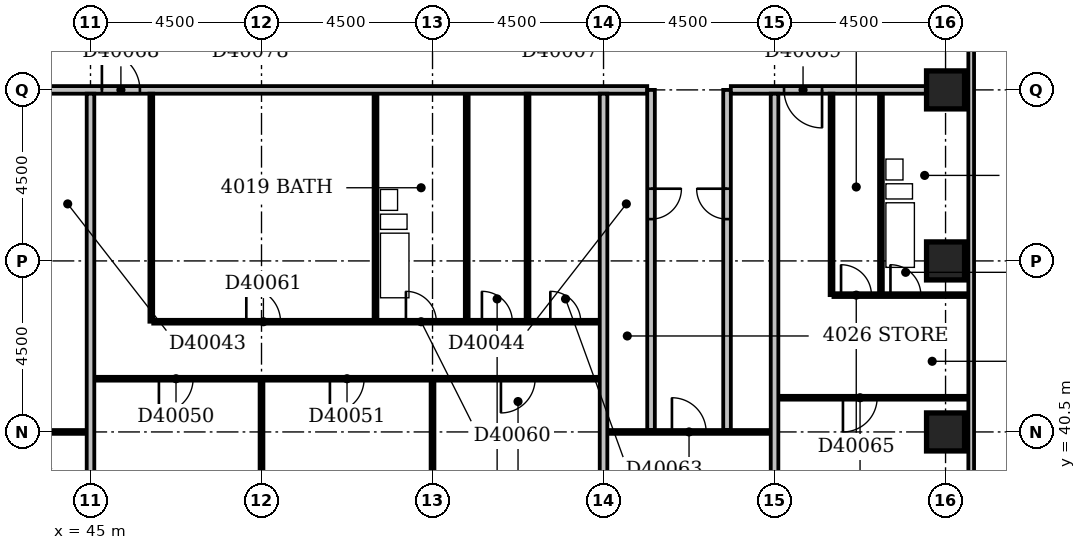
"""IFC4 building model, lengths in metres.
Left out: names, types, materials, properties, quantities, classifications, styles, units other than length and angle.
Written with IfcOpenShell. Run it as: python <this file> out.ifc"""

import sys

from ifc_helpers import new_model, si_unit, direction, frame, frame_2d, origin, origin_2d, place, context, subcontext, project, spatial, rectangle, extrude, element, fill, save


model = new_model("IFC4")
c1 = context("Model", 3, precision=1e-05, world=origin(), true_north=direction((0.0, 1.0)))
c2 = subcontext(c1, "Body", "Model", "MODEL_VIEW")
j1 = project(units=[si_unit("LENGTHUNIT", "METRE"), si_unit("PLANEANGLEUNIT", "RADIAN")], contexts=[c1])
p1 = place(None, origin())
s1 = spatial("IfcSite", under=j1, at=p1, CompositionType="ELEMENT")
p2 = place(p1, origin())
s2 = spatial("IfcBuilding", under=s1, at=p2, CompositionType="ELEMENT")
p3 = place(p2, frame((0.0, 0.0, 159.2)))
s3 = spatial("IfcBuildingStorey", under=s2, at=p3, CompositionType="ELEMENT", Elevation=159.2)
for number, where, z_axis, x_axis in (
    (1, (67.5, 40.5, -0.3), (0.0, 0.0, 1.0), (1.0, 0.0, 0.0)),
    (2, (67.5, 45.0, -0.3), (0.0, 0.0, 1.0), (1.0, 0.0, 0.0)),
    (3, (67.5, 49.5, -0.3), (0.0, 0.0, 1.0), (1.0, 0.0, 0.0)),
):
    element("IfcColumn", number, at=place(p3, frame(where, z_axis=z_axis, x_axis=x_axis)), inside=s3, PredefinedType="COLUMN", context=c2, shape_type="SweptSolid", body=[
        extrude(rectangle(XDim=1.0, YDim=1.0, at=origin_2d()), origin(), (0.0, 0.0, 1.0), 3.6),
    ])
p4 = place(p3, frame((68.175, 35.4, 0.0), z_axis=(0.0, 0.0, 1.0), x_axis=(0.0, 1.0, 0.0)))
e4 = element("IfcWall", 4, at=p4, inside=s3, PredefinedType="STANDARD", context=c2, shape_type="SweptSolid", body=[
    extrude(rectangle(XDim=23.85, YDim=0.15, at=frame_2d((11.925, 0.0))), origin(), (0.0, 0.0, 1.0), 2.7),
])
p5 = place(p4, frame((1.65, 0.0, 0.6)))
e5 = element("IfcOpeningElement", 5, at=p5, cuts=e4, PredefinedType="OPENING", context=c2, shape_type="SweptSolid", body=[
    extrude(rectangle(XDim=2.4, YDim=1.8, at=frame_2d((1.2, 0.9))), frame((0.0, 0.087, 0.0), z_axis=(0.0, -1.0, 0.0), x_axis=(1.0, 0.0, 0.0)), (0.0, 0.0, 1.0), 0.174),
])
p6 = place(p4, frame((19.65, 0.0, 0.6)))
e6 = element("IfcOpeningElement", 6, at=p6, cuts=e4, PredefinedType="OPENING", context=c2, shape_type="SweptSolid", body=[
    extrude(rectangle(XDim=2.4, YDim=1.8, at=frame_2d((1.2, 0.9))), frame((0.0, 0.087, 0.0), z_axis=(0.0, -1.0, 0.0), x_axis=(1.0, 0.0, 0.0)), (0.0, 0.0, 1.0), 0.174),
])
p7 = place(p3, frame((45.0, 36.5, 0.0), z_axis=(0.0, 0.0, 1.0), x_axis=(0.0, 1.0, 0.0)))
e7 = element("IfcWall", 7, at=p7, inside=s3, PredefinedType="PARTITIONING", context=c2, shape_type="SweptSolid", body=[
    extrude(rectangle(XDim=12.9, YDim=0.2, at=frame_2d((6.45, 0.0))), origin(), (0.0, 0.0, 1.0), 2.6),
])
p8 = place(p3, frame((49.5, 36.5, 0.0), z_axis=(0.0, 0.0, 1.0), x_axis=(0.0, 1.0, 0.0)))
e8 = element("IfcWall", 8, at=p8, inside=s3, PredefinedType="PARTITIONING", context=c2, shape_type="SweptSolid", body=[
    extrude(rectangle(XDim=5.35, YDim=0.1, at=frame_2d((2.675, 0.0))), origin(), (0.0, 0.0, 1.0), 3.3),
])
p9 = place(p3, frame((54.0, 36.5, 0.0), z_axis=(0.0, 0.0, 1.0), x_axis=(0.0, 1.0, 0.0)))
e9 = element("IfcWall", 9, at=p9, inside=s3, PredefinedType="PARTITIONING", context=c2, shape_type="SweptSolid", body=[
    extrude(rectangle(XDim=5.35, YDim=0.1, at=frame_2d((2.675, 0.0))), origin(), (0.0, 0.0, 1.0), 2.6),
])
p10 = place(p3, frame((58.5, 36.5, 0.0), z_axis=(0.0, 0.0, 1.0), x_axis=(0.0, 1.0, 0.0)))
e10 = element("IfcWall", 10, at=p10, inside=s3, PredefinedType="PARTITIONING", context=c2, shape_type="SweptSolid", body=[
    extrude(rectangle(XDim=12.9, YDim=0.2, at=frame_2d((6.45, 0.0))), origin(), (0.0, 0.0, 1.0), 3.3),
])
p11 = place(p3, frame((63.0, 36.5, 0.0), z_axis=(0.0, 0.0, 1.0), x_axis=(0.0, 1.0, 0.0)))
e11 = element("IfcWall", 11, at=p11, inside=s3, PredefinedType="PARTITIONING", context=c2, shape_type="SweptSolid", body=[
    extrude(rectangle(XDim=12.9, YDim=0.2, at=frame_2d((6.45, 0.0))), origin(), (0.0, 0.0, 1.0), 2.4),
])
p12 = place(p3, frame((40.6, 40.5, 0.0), z_axis=(0.0, 0.0, 1.0), x_axis=(1.0, 0.0, 0.0)))
e12 = element("IfcWall", 12, at=p12, inside=s3, PredefinedType="PARTITIONING", context=c2, shape_type="SweptSolid", body=[
    extrude(rectangle(XDim=4.3, YDim=0.1, at=frame_2d((2.15, 0.0))), origin(), (0.0, 0.0, 1.0), 3.3),
])
p13 = place(p12, frame((1.7, 0.0, 0.0)))
e13 = element("IfcOpeningElement", 13, at=p13, cuts=e12, PredefinedType="OPENING", context=c2, shape_type="SweptSolid", body=[
    extrude(rectangle(XDim=0.9, YDim=2.1, at=frame_2d((0.45, 1.05))), frame((0.0, 0.062, 0.0), z_axis=(0.0, -1.0, 0.0), x_axis=(1.0, 0.0, 0.0)), (0.0, 0.0, 1.0), 0.124),
])
p14 = place(p3, frame((58.6, 40.5, 0.0), z_axis=(0.0, 0.0, 1.0), x_axis=(1.0, 0.0, 0.0)))
e14 = element("IfcWall", 14, at=p14, inside=s3, PredefinedType="PARTITIONING", context=c2, shape_type="SweptSolid", body=[
    extrude(rectangle(XDim=4.3, YDim=0.1, at=frame_2d((2.15, 0.0))), origin(), (0.0, 0.0, 1.0), 3.3),
])
p15 = place(p14, frame((1.7, 0.0, 0.0)))
e15 = element("IfcOpeningElement", 15, at=p15, cuts=e14, PredefinedType="OPENING", context=c2, shape_type="SweptSolid", body=[
    extrude(rectangle(XDim=0.9, YDim=2.1, at=frame_2d((0.45, 1.05))), frame((0.0, 0.062, 0.0), z_axis=(0.0, -1.0, 0.0), x_axis=(1.0, 0.0, 0.0)), (0.0, 0.0, 1.0), 0.124),
])
p16 = place(p3, frame((59.75, 40.55, 0.0), z_axis=(0.0, 0.0, 1.0), x_axis=(0.0, 1.0, 0.0)))
e16 = element("IfcWall", 16, at=p16, inside=s3, PredefinedType="PARTITIONING", context=c2, shape_type="SweptSolid", body=[
    extrude(rectangle(XDim=8.95, YDim=0.2, at=frame_2d((4.475, 0.0))), origin(), (0.0, 0.0, 1.0), 3.3),
])
p17 = place(p16, frame((5.55, 0.0, 0.0)))
e17 = element("IfcOpeningElement", 17, at=p17, cuts=e16, PredefinedType="OPENING", context=c2, shape_type="SweptSolid", body=[
    extrude(rectangle(XDim=0.8, YDim=2.1, at=frame_2d((0.4, 1.05))), frame((0.0, 0.112, 0.0), z_axis=(0.0, -1.0, 0.0), x_axis=(1.0, 0.0, 0.0)), (0.0, 0.0, 1.0), 0.224),
])
p18 = place(p3, frame((61.75, 40.55, 0.0), z_axis=(0.0, 0.0, 1.0), x_axis=(0.0, 1.0, 0.0)))
e18 = element("IfcWall", 18, at=p18, inside=s3, PredefinedType="PARTITIONING", context=c2, shape_type="SweptSolid", body=[
    extrude(rectangle(XDim=8.95, YDim=0.2, at=frame_2d((4.475, 0.0))), origin(), (0.0, 0.0, 1.0), 3.3),
])
p19 = place(p18, frame((5.55, 0.0, 0.0)))
e19 = element("IfcOpeningElement", 19, at=p19, cuts=e18, PredefinedType="OPENING", context=c2, shape_type="SweptSolid", body=[
    extrude(rectangle(XDim=0.8, YDim=2.1, at=frame_2d((0.4, 1.05))), frame((0.0, 0.112, 0.0), z_axis=(0.0, -1.0, 0.0), x_axis=(1.0, 0.0, 0.0)), (0.0, 0.0, 1.0), 0.224),
])
p20 = place(p3, frame((63.1, 41.4, 0.0), z_axis=(0.0, 0.0, 1.0), x_axis=(1.0, 0.0, 0.0)))
e20 = element("IfcWall", 20, at=p20, inside=s3, PredefinedType="PARTITIONING", context=c2, shape_type="SweptSolid", body=[
    extrude(rectangle(XDim=5.0, YDim=0.1, at=frame_2d((2.5, 0.0))), origin(), (0.0, 0.0, 1.0), 3.3),
])
p21 = place(p20, frame((1.7, 0.0, 0.0)))
e21 = element("IfcOpeningElement", 21, at=p21, cuts=e20, PredefinedType="OPENING", context=c2, shape_type="SweptSolid", body=[
    extrude(rectangle(XDim=0.9, YDim=2.1, at=frame_2d((0.45, 1.05))), frame((0.0, 0.062, 0.0), z_axis=(0.0, -1.0, 0.0), x_axis=(1.0, 0.0, 0.0)), (0.0, 0.0, 1.0), 0.124),
])
p22 = place(p3, frame((45.1, 41.9, 0.0), z_axis=(0.0, 0.0, 1.0), x_axis=(1.0, 0.0, 0.0)))
e22 = element("IfcWall", 22, at=p22, inside=s3, PredefinedType="PARTITIONING", context=c2, shape_type="SweptSolid", body=[
    extrude(rectangle(XDim=13.3, YDim=0.1, at=frame_2d((6.65, 0.0))), origin(), (0.0, 0.0, 1.0), 3.3),
])
p23 = place(p22, frame((1.7, 0.0, 0.0)))
e23 = element("IfcOpeningElement", 23, at=p23, cuts=e22, PredefinedType="OPENING", context=c2, shape_type="SweptSolid", body=[
    extrude(rectangle(XDim=0.9, YDim=2.1, at=frame_2d((0.45, 1.05))), frame((0.0, 0.062, 0.0), z_axis=(0.0, -1.0, 0.0), x_axis=(1.0, 0.0, 0.0)), (0.0, 0.0, 1.0), 0.124),
])
p24 = place(p22, frame((6.2, 0.0, 0.0)))
e24 = element("IfcOpeningElement", 24, at=p24, cuts=e22, PredefinedType="OPENING", context=c2, shape_type="SweptSolid", body=[
    extrude(rectangle(XDim=0.9, YDim=2.1, at=frame_2d((0.45, 1.05))), frame((0.0, 0.062, 0.0), z_axis=(0.0, -1.0, 0.0), x_axis=(1.0, 0.0, 0.0)), (0.0, 0.0, 1.0), 0.124),
])
p25 = place(p22, frame((10.7, 0.0, 0.0)))
e25 = element("IfcOpeningElement", 25, at=p25, cuts=e22, PredefinedType="OPENING", context=c2, shape_type="SweptSolid", body=[
    extrude(rectangle(XDim=0.9, YDim=2.1, at=frame_2d((0.45, 1.05))), frame((0.0, 0.062, 0.0), z_axis=(0.0, -1.0, 0.0), x_axis=(1.0, 0.0, 0.0)), (0.0, 0.0, 1.0), 0.124),
])
p26 = place(p3, frame((46.6, 43.4, 0.0), z_axis=(0.0, 0.0, 1.0), x_axis=(0.0, 1.0, 0.0)))
e26 = element("IfcWall", 26, at=p26, inside=s3, PredefinedType="PARTITIONING", context=c2, shape_type="SweptSolid", body=[
    extrude(rectangle(XDim=6.0, YDim=0.1, at=frame_2d((3.0, 0.0))), origin(), (0.0, 0.0, 1.0), 3.3),
])
p27 = place(p3, frame((46.65, 43.4, 0.0), z_axis=(0.0, 0.0, 1.0), x_axis=(1.0, 0.0, 0.0)))
e27 = element("IfcWall", 27, at=p27, inside=s3, PredefinedType="PARTITIONING", context=c2, shape_type="SweptSolid", body=[
    extrude(rectangle(XDim=11.75, YDim=0.1, at=frame_2d((5.875, 0.0))), origin(), (0.0, 0.0, 1.0), 3.3),
])
p28 = place(p27, frame((6.65, 0.0, 0.0)))
e28 = element("IfcOpeningElement", 28, at=p28, cuts=e27, PredefinedType="OPENING", context=c2, shape_type="SweptSolid", body=[
    extrude(rectangle(XDim=0.8, YDim=2.1, at=frame_2d((0.4, 1.05))), frame((0.0, 0.062, 0.0), z_axis=(0.0, -1.0, 0.0), x_axis=(1.0, 0.0, 0.0)), (0.0, 0.0, 1.0), 0.124),
])
p29 = place(p27, frame((2.45, 0.0, 0.0)))
e29 = element("IfcOpeningElement", 29, at=p29, cuts=e27, PredefinedType="OPENING", context=c2, shape_type="SweptSolid", body=[
    extrude(rectangle(XDim=0.9, YDim=2.1, at=frame_2d((0.45, 1.05))), frame((0.0, 0.062, 0.0), z_axis=(0.0, -1.0, 0.0), x_axis=(1.0, 0.0, 0.0)), (0.0, 0.0, 1.0), 0.124),
])
p30 = place(p27, frame((8.65, 0.0, 0.0)))
e30 = element("IfcOpeningElement", 30, at=p30, cuts=e27, PredefinedType="OPENING", context=c2, shape_type="SweptSolid", body=[
    extrude(rectangle(XDim=0.8, YDim=2.1, at=frame_2d((0.4, 1.05))), frame((0.0, 0.062, 0.0), z_axis=(0.0, -1.0, 0.0), x_axis=(1.0, 0.0, 0.0)), (0.0, 0.0, 1.0), 0.124),
])
p31 = place(p27, frame((10.45, 0.0, 0.0)))
e31 = element("IfcOpeningElement", 31, at=p31, cuts=e27, PredefinedType="OPENING", context=c2, shape_type="SweptSolid", body=[
    extrude(rectangle(XDim=0.8, YDim=2.1, at=frame_2d((0.4, 1.05))), frame((0.0, 0.062, 0.0), z_axis=(0.0, -1.0, 0.0), x_axis=(1.0, 0.0, 0.0)), (0.0, 0.0, 1.0), 0.124),
])
for number, where, z_axis, x_axis in (
    (32, (52.5, 43.45, 0.0), (0.0, 0.0, 1.0), (0.0, 1.0, 0.0)),
    (33, (54.9, 43.45, 0.0), (0.0, 0.0, 1.0), (0.0, 1.0, 0.0)),
):
    element("IfcWall", number, at=place(p3, frame(where, z_axis=z_axis, x_axis=x_axis)), inside=s3, PredefinedType="PLUMBINGWALL", context=c2, shape_type="SweptSolid", body=[
        extrude(rectangle(XDim=5.95, YDim=0.1, at=frame_2d((2.975, 0.0))), origin(), (0.0, 0.0, 1.0), 3.3),
    ])
p32 = place(p3, frame((56.5, 43.45, 0.0), z_axis=(0.0, 0.0, 1.0), x_axis=(0.0, 1.0, 0.0)))
e34 = element("IfcWall", 34, at=p32, inside=s3, PredefinedType="PARTITIONING", context=c2, shape_type="SweptSolid", body=[
    extrude(rectangle(XDim=5.95, YDim=0.1, at=frame_2d((2.975, 0.0))), origin(), (0.0, 0.0, 1.0), 3.3),
])
p33 = place(p3, frame((64.5, 44.1, 0.0), z_axis=(0.0, 0.0, 1.0), x_axis=(0.0, 1.0, 0.0)))
e35 = element("IfcWall", 35, at=p33, inside=s3, PredefinedType="PARTITIONING", context=c2, shape_type="SweptSolid", body=[
    extrude(rectangle(XDim=5.3, YDim=0.1, at=frame_2d((2.65, 0.0))), origin(), (0.0, 0.0, 1.0), 3.3),
])
p34 = place(p3, frame((64.55, 44.1, 0.0), z_axis=(0.0, 0.0, 1.0), x_axis=(1.0, 0.0, 0.0)))
e36 = element("IfcWall", 36, at=p34, inside=s3, PredefinedType="PARTITIONING", context=c2, shape_type="SweptSolid", body=[
    extrude(rectangle(XDim=3.55, YDim=0.1, at=frame_2d((1.775, 0.0))), origin(), (0.0, 0.0, 1.0), 3.3),
])
p35 = place(p34, frame((1.5, 0.0, 0.0)))
e37 = element("IfcOpeningElement", 37, at=p35, cuts=e36, PredefinedType="OPENING", context=c2, shape_type="SweptSolid", body=[
    extrude(rectangle(XDim=0.8, YDim=2.1, at=frame_2d((0.4, 1.05))), frame((0.0, 0.062, 0.0), z_axis=(0.0, -1.0, 0.0), x_axis=(1.0, 0.0, 0.0)), (0.0, 0.0, 1.0), 0.124),
])
p36 = place(p34, frame((0.2, 0.0, 0.0)))
e38 = element("IfcOpeningElement", 38, at=p36, cuts=e36, PredefinedType="OPENING", context=c2, shape_type="SweptSolid", body=[
    extrude(rectangle(XDim=0.8, YDim=2.1, at=frame_2d((0.4, 1.05))), frame((0.0, 0.062, 0.0), z_axis=(0.0, -1.0, 0.0), x_axis=(1.0, 0.0, 0.0)), (0.0, 0.0, 1.0), 0.124),
])
p37 = place(p3, frame((65.8, 44.15, 0.0), z_axis=(0.0, 0.0, 1.0), x_axis=(0.0, 1.0, 0.0)))
e39 = element("IfcWall", 39, at=p37, inside=s3, PredefinedType="PLUMBINGWALL", context=c2, shape_type="SweptSolid", body=[
    extrude(rectangle(XDim=5.25, YDim=0.1, at=frame_2d((2.625, 0.0))), origin(), (0.0, 0.0, 1.0), 3.3),
])
p38 = place(p3, frame((43.85, 49.5, 0.0), z_axis=(0.0, 0.0, 1.0), x_axis=(1.0, 0.0, 0.0)))
e40 = element("IfcWall", 40, at=p38, inside=s3, PredefinedType="PARTITIONING", context=c2, shape_type="SweptSolid", body=[
    extrude(rectangle(XDim=15.8, YDim=0.2, at=frame_2d((7.9, 0.0))), origin(), (0.0, 0.0, 1.0), 3.3),
])
p39 = place(p38, frame((1.45, 0.0, 0.0)))
e41 = element("IfcOpeningElement", 41, at=p39, cuts=e40, PredefinedType="OPENING", context=c2, shape_type="SweptSolid", body=[
    extrude(rectangle(XDim=1.0, YDim=2.1, at=frame_2d((0.5, 1.05))), frame((0.0, 0.112, 0.0), z_axis=(0.0, -1.0, 0.0), x_axis=(1.0, 0.0, 0.0)), (0.0, 0.0, 1.0), 0.224),
])
p40 = place(p3, frame((61.85, 49.5, 0.0), z_axis=(0.0, 0.0, 1.0), x_axis=(1.0, 0.0, 0.0)))
e42 = element("IfcWall", 42, at=p40, inside=s3, PredefinedType="PARTITIONING", context=c2, shape_type="SweptSolid", body=[
    extrude(rectangle(XDim=5.15, YDim=0.2, at=frame_2d((2.575, 0.0))), origin(), (0.0, 0.0, 1.0), 3.3),
])
p41 = place(p40, frame((1.4, 0.0, 0.0)))
e43 = element("IfcOpeningElement", 43, at=p41, cuts=e42, PredefinedType="OPENING", context=c2, shape_type="SweptSolid", body=[
    extrude(rectangle(XDim=1.0, YDim=2.1, at=frame_2d((0.5, 1.05))), frame((0.0, 0.112, 0.0), z_axis=(0.0, -1.0, 0.0), x_axis=(1.0, 0.0, 0.0)), (0.0, 0.0, 1.0), 0.224),
])
p42 = place(p15, origin())
e44 = element("IfcDoor", 44, at=p42, inside=s3, OperationType="SINGLE_SWING_LEFT", PredefinedType="DOOR", context=c2, shape_type="SweptSolid", body=[
    extrude(rectangle(XDim=0.9, YDim=2.1, at=frame_2d((0.45, 1.05))), frame((0.0, 0.025, 0.0), z_axis=(0.0, -1.0, 0.0), x_axis=(1.0, 0.0, 0.0)), (0.0, 0.0, 1.0), 0.05),
])
fill(e15, e44)
p43 = place(p17, origin())
e45 = element("IfcDoor", 45, at=p43, inside=s3, OperationType="SINGLE_SWING_RIGHT", PredefinedType="DOOR", context=c2, shape_type="SweptSolid", body=[
    extrude(rectangle(XDim=0.8, YDim=2.1, at=frame_2d((0.4, 1.05))), frame((0.0, 0.025, 0.0), z_axis=(0.0, -1.0, 0.0), x_axis=(1.0, 0.0, 0.0)), (0.0, 0.0, 1.0), 0.05),
])
fill(e17, e45)
p44 = place(p19, frame((0.8, 0.0, 0.0), z_axis=(0.0, 0.0, 1.0), x_axis=(-1.0, 0.0, 0.0)))
e46 = element("IfcDoor", 46, at=p44, inside=s3, OperationType="SINGLE_SWING_LEFT", PredefinedType="DOOR", context=c2, shape_type="SweptSolid", body=[
    extrude(rectangle(XDim=0.8, YDim=2.1, at=frame_2d((0.4, 1.05))), frame((0.0, 0.025, 0.0), z_axis=(0.0, -1.0, 0.0), x_axis=(1.0, 0.0, 0.0)), (0.0, 0.0, 1.0), 0.05),
])
fill(e19, e46)
p45 = place(p21, frame((0.9, 0.0, 0.0), z_axis=(0.0, 0.0, 1.0), x_axis=(-1.0, 0.0, 0.0)))
e47 = element("IfcDoor", 47, at=p45, inside=s3, OperationType="SINGLE_SWING_RIGHT", PredefinedType="DOOR", context=c2, shape_type="SweptSolid", body=[
    extrude(rectangle(XDim=0.9, YDim=2.1, at=frame_2d((0.45, 1.05))), frame((0.0, 0.025, 0.0), z_axis=(0.0, -1.0, 0.0), x_axis=(1.0, 0.0, 0.0)), (0.0, 0.0, 1.0), 0.05),
])
fill(e21, e47)
p46 = place(p23, frame((0.9, 0.0, 0.0), z_axis=(0.0, 0.0, 1.0), x_axis=(-1.0, 0.0, 0.0)))
e48 = element("IfcDoor", 48, at=p46, inside=s3, OperationType="SINGLE_SWING_RIGHT", PredefinedType="DOOR", context=c2, shape_type="SweptSolid", body=[
    extrude(rectangle(XDim=0.9, YDim=2.1, at=frame_2d((0.45, 1.05))), frame((0.0, 0.025, 0.0), z_axis=(0.0, -1.0, 0.0), x_axis=(1.0, 0.0, 0.0)), (0.0, 0.0, 1.0), 0.05),
])
fill(e23, e48)
p47 = place(p24, frame((0.9, 0.0, 0.0), z_axis=(0.0, 0.0, 1.0), x_axis=(-1.0, 0.0, 0.0)))
e49 = element("IfcDoor", 49, at=p47, inside=s3, OperationType="SINGLE_SWING_RIGHT", PredefinedType="DOOR", context=c2, shape_type="SweptSolid", body=[
    extrude(rectangle(XDim=0.9, YDim=2.1, at=frame_2d((0.45, 1.05))), frame((0.0, 0.025, 0.0), z_axis=(0.0, -1.0, 0.0), x_axis=(1.0, 0.0, 0.0)), (0.0, 0.0, 1.0), 0.05),
])
fill(e24, e49)
p48 = place(p25, frame((0.9, 0.0, 0.0), z_axis=(0.0, 0.0, 1.0), x_axis=(-1.0, 0.0, 0.0)))
e50 = element("IfcDoor", 50, at=p48, inside=s3, OperationType="SINGLE_SWING_RIGHT", PredefinedType="DOOR", context=c2, shape_type="SweptSolid", body=[
    extrude(rectangle(XDim=0.9, YDim=2.1, at=frame_2d((0.45, 1.05))), frame((0.0, 0.025, 0.0), z_axis=(0.0, -1.0, 0.0), x_axis=(1.0, 0.0, 0.0)), (0.0, 0.0, 1.0), 0.05),
])
fill(e25, e50)
p49 = place(p28, origin())
e51 = element("IfcDoor", 51, at=p49, inside=s3, OperationType="SINGLE_SWING_LEFT", PredefinedType="DOOR", context=c2, shape_type="SweptSolid", body=[
    extrude(rectangle(XDim=0.8, YDim=2.1, at=frame_2d((0.4, 1.05))), frame((0.0, 0.025, 0.0), z_axis=(0.0, -1.0, 0.0), x_axis=(1.0, 0.0, 0.0)), (0.0, 0.0, 1.0), 0.05),
])
fill(e28, e51)
p50 = place(p29, origin())
e52 = element("IfcDoor", 52, at=p50, inside=s3, OperationType="SINGLE_SWING_LEFT", PredefinedType="DOOR", context=c2, shape_type="SweptSolid", body=[
    extrude(rectangle(XDim=0.9, YDim=2.1, at=frame_2d((0.45, 1.05))), frame((0.0, 0.025, 0.0), z_axis=(0.0, -1.0, 0.0), x_axis=(1.0, 0.0, 0.0)), (0.0, 0.0, 1.0), 0.05),
])
fill(e29, e52)
p51 = place(p30, origin())
e53 = element("IfcDoor", 53, at=p51, inside=s3, OperationType="SINGLE_SWING_LEFT", PredefinedType="DOOR", context=c2, shape_type="SweptSolid", body=[
    extrude(rectangle(XDim=0.8, YDim=2.1, at=frame_2d((0.4, 1.05))), frame((0.0, 0.025, 0.0), z_axis=(0.0, -1.0, 0.0), x_axis=(1.0, 0.0, 0.0)), (0.0, 0.0, 1.0), 0.05),
])
fill(e30, e53)
p52 = place(p31, origin())
e54 = element("IfcDoor", 54, at=p52, inside=s3, OperationType="SINGLE_SWING_LEFT", PredefinedType="DOOR", context=c2, shape_type="SweptSolid", body=[
    extrude(rectangle(XDim=0.8, YDim=2.1, at=frame_2d((0.4, 1.05))), frame((0.0, 0.025, 0.0), z_axis=(0.0, -1.0, 0.0), x_axis=(1.0, 0.0, 0.0)), (0.0, 0.0, 1.0), 0.05),
])
fill(e31, e54)
p53 = place(p35, origin())
e55 = element("IfcDoor", 55, at=p53, inside=s3, OperationType="SINGLE_SWING_LEFT", PredefinedType="DOOR", context=c2, shape_type="SweptSolid", body=[
    extrude(rectangle(XDim=0.8, YDim=2.1, at=frame_2d((0.4, 1.05))), frame((0.0, 0.025, 0.0), z_axis=(0.0, -1.0, 0.0), x_axis=(1.0, 0.0, 0.0)), (0.0, 0.0, 1.0), 0.05),
])
fill(e37, e55)
p54 = place(p36, origin())
e56 = element("IfcDoor", 56, at=p54, inside=s3, OperationType="SINGLE_SWING_LEFT", PredefinedType="DOOR", context=c2, shape_type="SweptSolid", body=[
    extrude(rectangle(XDim=0.8, YDim=2.1, at=frame_2d((0.4, 1.05))), frame((0.0, 0.025, 0.0), z_axis=(0.0, -1.0, 0.0), x_axis=(1.0, 0.0, 0.0)), (0.0, 0.0, 1.0), 0.05),
])
fill(e38, e56)
p55 = place(p39, origin())
e57 = element("IfcDoor", 57, at=p55, inside=s3, OperationType="SINGLE_SWING_LEFT", PredefinedType="DOOR", context=c2, shape_type="SweptSolid", body=[
    extrude(rectangle(XDim=1.0, YDim=2.1, at=frame_2d((0.5, 1.05))), frame((0.0, 0.025, 0.0), z_axis=(0.0, -1.0, 0.0), x_axis=(1.0, 0.0, 0.0)), (0.0, 0.0, 1.0), 0.05),
])
fill(e41, e57)
p56 = place(p41, origin())
e58 = element("IfcDoor", 58, at=p56, inside=s3, OperationType="SINGLE_SWING_RIGHT", PredefinedType="DOOR", context=c2, shape_type="SweptSolid", body=[
    extrude(rectangle(XDim=1.0, YDim=2.1, at=frame_2d((0.5, 1.05))), frame((0.0, 0.025, 0.0), z_axis=(0.0, -1.0, 0.0), x_axis=(1.0, 0.0, 0.0)), (0.0, 0.0, 1.0), 0.05),
])
fill(e43, e58)
save(model, sys.argv[1])
